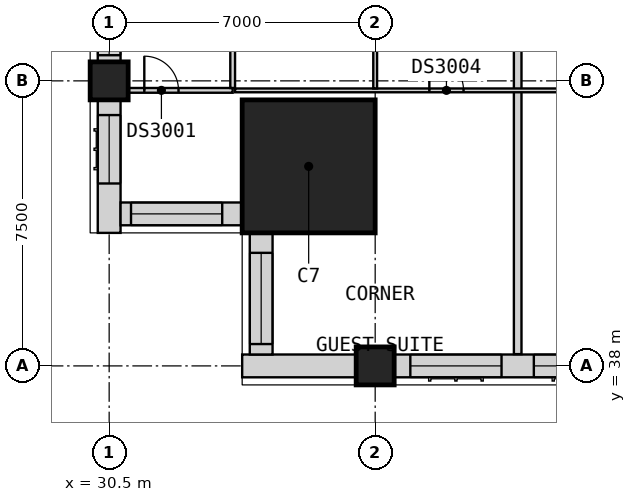
"""IFC4 building model, lengths in metres.
Left out: names, types, materials, properties, quantities, classifications, styles, units other than length and angle.
Written with IfcOpenShell. Run it as: python <this file> out.ifc"""

import sys

from ifc_helpers import new_model, si_unit, direction, frame, frame_2d, origin, origin_2d, place, context, subcontext, project, spatial, rectangle, extrude, element, fill, save


model = new_model("IFC4")
c1 = context("Model", 3, precision=1e-05, world=origin(), true_north=direction((0.0, 1.0)))
c2 = subcontext(c1, "Body", "Model", "MODEL_VIEW")
j1 = project(units=[si_unit("LENGTHUNIT", "METRE"), si_unit("PLANEANGLEUNIT", "RADIAN")], contexts=[c1])
p1 = place(None, origin())
s1 = spatial("IfcSite", under=j1, at=p1, CompositionType="ELEMENT")
p2 = place(p1, origin())
s2 = spatial("IfcBuilding", under=s1, at=p2, CompositionType="ELEMENT")
p3 = place(p2, frame((0.0, 0.0, 137.4)))
s3 = spatial("IfcBuildingStorey", under=s2, at=p3, CompositionType="ELEMENT", Elevation=137.4)
for number, where, z_axis, x_axis in (
    (1, (30.5, 45.5, 0.0), (0.0, 0.0, 1.0), (1.0, 0.0, 0.0)),
    (2, (37.5, 38.0, 0.0), (0.0, 0.0, 1.0), (1.0, 0.0, 0.0)),
):
    element("IfcColumn", number, at=place(p3, frame(where, z_axis=z_axis, x_axis=x_axis)), inside=s3, PredefinedType="COLUMN", context=c2, shape_type="SweptSolid", body=[
        extrude(rectangle(XDim=1.0, YDim=1.0, at=origin_2d()), origin(), (0.0, 0.0, 1.0), 3.6),
    ])
p4 = place(p3, frame((35.75, 43.25, 0.0), z_axis=(0.0, 0.0, 1.0), x_axis=(1.0, 0.0, 0.0)))
e3 = element("IfcColumn", 3, at=p4, inside=s3, PredefinedType="COLUMN", context=c2, shape_type="SweptSolid", body=[
    extrude(rectangle(XDim=3.5, YDim=3.5, at=origin_2d()), origin(), (0.0, 0.0, 1.0), 3.6),
])
p5 = place(p3, frame((34.0, 38.0, 0.0), z_axis=(0.0, 0.0, 1.0), x_axis=(1.0, 0.0, 0.0)))
e4 = element("IfcWall", 4, at=p5, inside=s3, PredefinedType="SOLIDWALL", context=c2, shape_type="SweptSolid", body=[
    extrude(rectangle(XDim=3.0, YDim=0.6, at=frame_2d((1.5, 0.0))), origin(), (0.0, 0.0, 1.0), 3.35),
])
p6 = place(p3, frame((38.0, 38.0, 0.0), z_axis=(0.0, 0.0, 1.0), x_axis=(1.0, 0.0, 0.0)))
e5 = element("IfcWall", 5, at=p6, inside=s3, PredefinedType="SOLIDWALL", context=c2, shape_type="SweptSolid", body=[
    extrude(rectangle(XDim=6.5, YDim=0.6, at=frame_2d((3.25, 0.0))), origin(), (0.0, 0.0, 1.0), 2.85),
])
p7 = place(p6, frame((0.425, 0.0, 0.8)))
e6 = element("IfcOpeningElement", 6, at=p7, cuts=e5, PredefinedType="OPENING", context=c2, shape_type="SweptSolid", body=[
    extrude(rectangle(XDim=2.4, YDim=1.8, at=frame_2d((1.2, 0.9))), frame((0.0, 0.31, 0.0), z_axis=(0.0, -1.0, 0.0), x_axis=(1.0, 0.0, 0.0)), (0.0, 0.0, 1.0), 0.62),
])
p8 = place(p6, frame((3.675, 0.0, 0.8)))
e7 = element("IfcOpeningElement", 7, at=p8, cuts=e5, PredefinedType="OPENING", context=c2, shape_type="SweptSolid", body=[
    extrude(rectangle(XDim=2.4, YDim=1.8, at=frame_2d((1.2, 0.9))), frame((0.0, 0.31, 0.0), z_axis=(0.0, -1.0, 0.0), x_axis=(1.0, 0.0, 0.0)), (0.0, 0.0, 1.0), 0.62),
])
p9 = place(p3, frame((30.5, 52.0, 0.0), z_axis=(0.0, 0.0, 1.0), x_axis=(0.0, -1.0, 0.0)))
e8 = element("IfcWall", 8, at=p9, inside=s3, PredefinedType="SOLIDWALL", context=c2, shape_type="SweptSolid", body=[
    extrude(rectangle(XDim=6.0, YDim=0.6, at=frame_2d((3.0, 0.0))), origin(), (0.0, 0.0, 1.0), 2.85),
])
p10 = place(p9, frame((3.425, 0.0, 0.8)))
e9 = element("IfcOpeningElement", 9, at=p10, cuts=e8, PredefinedType="OPENING", context=c2, shape_type="SweptSolid", body=[
    extrude(rectangle(XDim=2.4, YDim=1.8, at=frame_2d((1.2, 0.9))), frame((0.0, 0.31, 0.0), z_axis=(0.0, -1.0, 0.0), x_axis=(1.0, 0.0, 0.0)), (0.0, 0.0, 1.0), 0.62),
])
p11 = place(p9, frame((0.425, 0.0, 0.8)))
e10 = element("IfcOpeningElement", 10, at=p11, cuts=e8, PredefinedType="OPENING", context=c2, shape_type="SweptSolid", body=[
    extrude(rectangle(XDim=2.4, YDim=1.8, at=frame_2d((1.2, 0.9))), frame((0.0, 0.31, 0.0), z_axis=(0.0, -1.0, 0.0), x_axis=(1.0, 0.0, 0.0)), (0.0, 0.0, 1.0), 0.62),
])
p12 = place(p3, frame((30.5, 45.0, 0.0), z_axis=(0.0, 0.0, 1.0), x_axis=(0.0, -1.0, 0.0)))
e11 = element("IfcWall", 11, at=p12, inside=s3, PredefinedType="SOLIDWALL", context=c2, shape_type="SweptSolid", body=[
    extrude(rectangle(XDim=3.5, YDim=0.6, at=frame_2d((1.75, 0.0))), origin(), (0.0, 0.0, 1.0), 3.35),
])
p13 = place(p12, frame((0.4, 0.0, 0.8)))
e12 = element("IfcOpeningElement", 12, at=p13, cuts=e11, PredefinedType="OPENING", context=c2, shape_type="SweptSolid", body=[
    extrude(rectangle(XDim=1.8, YDim=1.8, at=frame_2d((0.9, 0.9))), frame((0.0, 0.31, 0.0), z_axis=(0.0, -1.0, 0.0), x_axis=(1.0, 0.0, 0.0)), (0.0, 0.0, 1.0), 0.62),
])
p14 = place(p3, frame((30.8, 42.0, 0.0), z_axis=(0.0, 0.0, 1.0), x_axis=(1.0, 0.0, 0.0)))
e13 = element("IfcWall", 13, at=p14, inside=s3, PredefinedType="SOLIDWALL", context=c2, shape_type="SweptSolid", body=[
    extrude(rectangle(XDim=3.2, YDim=0.6, at=frame_2d((1.6, 0.0))), origin(), (0.0, 0.0, 1.0), 3.35),
])
p15 = place(p14, frame((0.275, 0.0, 0.8)))
e14 = element("IfcOpeningElement", 14, at=p15, cuts=e13, PredefinedType="OPENING", context=c2, shape_type="SweptSolid", body=[
    extrude(rectangle(XDim=2.4, YDim=1.8, at=frame_2d((1.2, 0.9))), frame((0.0, 0.31, 0.0), z_axis=(0.0, -1.0, 0.0), x_axis=(1.0, 0.0, 0.0)), (0.0, 0.0, 1.0), 0.62),
])
p16 = place(p3, frame((34.5, 41.5, 0.0), z_axis=(0.0, 0.0, 1.0), x_axis=(0.0, -1.0, 0.0)))
e15 = element("IfcWall", 15, at=p16, inside=s3, PredefinedType="SOLIDWALL", context=c2, shape_type="SweptSolid", body=[
    extrude(rectangle(XDim=3.2, YDim=0.6, at=frame_2d((1.6, 0.0))), origin(), (0.0, 0.0, 1.0), 3.35),
])
p17 = place(p16, frame((0.525, 0.0, 0.8)))
e16 = element("IfcOpeningElement", 16, at=p17, cuts=e15, PredefinedType="OPENING", context=c2, shape_type="SweptSolid", body=[
    extrude(rectangle(XDim=2.4, YDim=1.8, at=frame_2d((1.2, 0.9))), frame((0.0, 0.31, 0.0), z_axis=(0.0, -1.0, 0.0), x_axis=(1.0, 0.0, 0.0)), (0.0, 0.0, 1.0), 0.62),
])
p18 = place(p3, frame((41.25, 38.31, 0.0), z_axis=(0.0, 0.0, 1.0), x_axis=(0.0, 1.0, 0.0)))
e17 = element("IfcWall", 17, at=p18, inside=s3, PredefinedType="PARTITIONING", context=c2, shape_type="SweptSolid", body=[
    extrude(rectangle(XDim=11.715, YDim=0.2, at=frame_2d((5.857, 0.0))), origin(), (0.0, 0.0, 1.0), 3.35),
])
p19 = place(p3, frame((33.812, 45.25, 0.0), z_axis=(0.0, 0.0, 1.0), x_axis=(1.0, 0.0, 0.0)))
e18 = element("IfcWall", 18, at=p19, inside=s3, PredefinedType="PARTITIONING", context=c2, shape_type="SweptSolid", body=[
    extrude(rectangle(XDim=11.875, YDim=0.1, at=frame_2d((5.938, 0.0))), origin(), (0.0, 0.0, 1.0), 3.35),
])
p20 = place(p19, frame((5.113, 0.0, 0.0)))
e19 = element("IfcOpeningElement", 19, at=p20, cuts=e18, PredefinedType="OPENING", context=c2, shape_type="SweptSolid", body=[
    extrude(rectangle(XDim=0.9, YDim=2.1, at=frame_2d((0.45, 1.05))), frame((0.0, 0.06, 0.0), z_axis=(0.0, -1.0, 0.0), x_axis=(1.0, 0.0, 0.0)), (0.0, 0.0, 1.0), 0.12),
])
p21 = place(p19, frame((9.238, 0.0, 0.0)))
e20 = element("IfcOpeningElement", 20, at=p21, cuts=e18, PredefinedType="OPENING", context=c2, shape_type="SweptSolid", body=[
    extrude(rectangle(XDim=0.9, YDim=2.1, at=frame_2d((0.45, 1.05))), frame((0.0, 0.06, 0.0), z_axis=(0.0, -1.0, 0.0), x_axis=(1.0, 0.0, 0.0)), (0.0, 0.0, 1.0), 0.12),
])
p22 = place(p3, frame((37.5, 45.3, 0.0), z_axis=(0.0, 0.0, 1.0), x_axis=(0.0, 1.0, 0.0)))
e21 = element("IfcWall", 21, at=p22, inside=s3, PredefinedType="PARTITIONING", context=c2, shape_type="SweptSolid", body=[
    extrude(rectangle(XDim=4.725, YDim=0.1, at=frame_2d((2.362, 0.0))), origin(), (0.0, 0.0, 1.0), 3.35),
])
p23 = place(p22, frame((1.925, 0.0, 0.0)))
e22 = element("IfcOpeningElement", 22, at=p23, cuts=e21, PredefinedType="OPENING", context=c2, shape_type="SweptSolid", body=[
    extrude(rectangle(XDim=0.9, YDim=2.1, at=frame_2d((0.45, 1.05))), frame((0.0, 0.06, 0.0), z_axis=(0.0, -1.0, 0.0), x_axis=(1.0, 0.0, 0.0)), (0.0, 0.0, 1.0), 0.12),
])
p24 = place(p3, frame((30.0, 45.25, 0.0), z_axis=(0.0, 0.0, 1.0), x_axis=(1.0, 0.0, 0.0)))
e23 = element("IfcWall", 23, at=p24, inside=s3, PredefinedType="PARTITIONING", context=c2, shape_type="SweptSolid", body=[
    extrude(rectangle(XDim=3.75, YDim=0.125, at=frame_2d((1.875, 0.0))), origin(), (0.0, 0.0, 1.0), 3.35),
])
p25 = place(p24, frame((1.425, 0.0, 0.0)))
e24 = element("IfcOpeningElement", 24, at=p25, cuts=e23, PredefinedType="OPENING", context=c2, shape_type="SweptSolid", body=[
    extrude(rectangle(XDim=0.9, YDim=2.1, at=frame_2d((0.45, 1.05))), frame((0.0, 0.073, 0.0), z_axis=(0.0, -1.0, 0.0), x_axis=(1.0, 0.0, 0.0)), (0.0, 0.0, 1.0), 0.145),
])
p26 = place(p3, frame((33.75, 45.312, 0.0), z_axis=(0.0, 0.0, 1.0), x_axis=(0.0, 1.0, 0.0)))
e25 = element("IfcWall", 25, at=p26, inside=s3, PredefinedType="PARTITIONING", context=c2, shape_type="SweptSolid", body=[
    extrude(rectangle(XDim=4.712, YDim=0.125, at=frame_2d((2.356, 0.0))), origin(), (0.0, 0.0, 1.0), 3.35),
])
p27 = place(p7, origin())
e26 = element("IfcWindow", 26, at=p27, inside=s3, PartitioningType="SINGLE_PANEL", PredefinedType="WINDOW", context=c2, shape_type="SweptSolid", body=[
    extrude(rectangle(XDim=2.4, YDim=1.8, at=frame_2d((1.2, 0.9))), frame((0.0, -0.07, 0.0), z_axis=(0.0, -1.0, 0.0), x_axis=(1.0, 0.0, 0.0)), (0.0, 0.0, 1.0), 0.06),
])
fill(e6, e26)
p28 = place(p8, origin())
e27 = element("IfcWindow", 27, at=p28, inside=s3, PartitioningType="SINGLE_PANEL", PredefinedType="WINDOW", context=c2, shape_type="SweptSolid", body=[
    extrude(rectangle(XDim=2.4, YDim=1.8, at=frame_2d((1.2, 0.9))), frame((0.0, -0.07, 0.0), z_axis=(0.0, -1.0, 0.0), x_axis=(1.0, 0.0, 0.0)), (0.0, 0.0, 1.0), 0.06),
])
fill(e7, e27)
p29 = place(p10, origin())
e28 = element("IfcWindow", 28, at=p29, inside=s3, PartitioningType="SINGLE_PANEL", PredefinedType="WINDOW", context=c2, shape_type="SweptSolid", body=[
    extrude(rectangle(XDim=2.4, YDim=1.8, at=frame_2d((1.2, 0.9))), frame((0.0, -0.07, 0.0), z_axis=(0.0, -1.0, 0.0), x_axis=(1.0, 0.0, 0.0)), (0.0, 0.0, 1.0), 0.06),
])
fill(e9, e28)
p30 = place(p13, origin())
e29 = element("IfcWindow", 29, at=p30, inside=s3, PartitioningType="SINGLE_PANEL", PredefinedType="WINDOW", context=c2, shape_type="SweptSolid", body=[
    extrude(rectangle(XDim=1.8, YDim=1.8, at=frame_2d((0.9, 0.9))), frame((0.0, -0.07, 0.0), z_axis=(0.0, -1.0, 0.0), x_axis=(1.0, 0.0, 0.0)), (0.0, 0.0, 1.0), 0.06),
])
fill(e12, e29)
p31 = place(p15, origin())
e30 = element("IfcWindow", 30, at=p31, inside=s3, PartitioningType="SINGLE_PANEL", PredefinedType="WINDOW", context=c2, shape_type="SweptSolid", body=[
    extrude(rectangle(XDim=2.4, YDim=1.8, at=frame_2d((1.2, 0.9))), frame((0.0, -0.07, 0.0), z_axis=(0.0, -1.0, 0.0), x_axis=(1.0, 0.0, 0.0)), (0.0, 0.0, 1.0), 0.06),
])
fill(e14, e30)
p32 = place(p17, origin())
e31 = element("IfcWindow", 31, at=p32, inside=s3, PartitioningType="SINGLE_PANEL", PredefinedType="WINDOW", context=c2, shape_type="SweptSolid", body=[
    extrude(rectangle(XDim=2.4, YDim=1.8, at=frame_2d((1.2, 0.9))), frame((0.0, -0.07, 0.0), z_axis=(0.0, -1.0, 0.0), x_axis=(1.0, 0.0, 0.0)), (0.0, 0.0, 1.0), 0.06),
])
fill(e16, e31)
p33 = place(p25, origin())
e32 = element("IfcDoor", 32, at=p33, inside=s3, OperationType="SINGLE_SWING_LEFT", PredefinedType="DOOR", context=c2, shape_type="SweptSolid", body=[
    extrude(rectangle(XDim=0.9, YDim=2.1, at=frame_2d((0.45, 1.05))), frame((0.0, 0.025, 0.0), z_axis=(0.0, -1.0, 0.0), x_axis=(1.0, 0.0, 0.0)), (0.0, 0.0, 1.0), 0.05),
])
fill(e24, e32)
p34 = place(p20, origin())
e33 = element("IfcDoor", 33, at=p34, inside=s3, OperationType="SINGLE_SWING_LEFT", PredefinedType="DOOR", context=c2, shape_type="SweptSolid", body=[
    extrude(rectangle(XDim=0.9, YDim=2.1, at=frame_2d((0.45, 1.05))), frame((0.0, 0.025, 0.0), z_axis=(0.0, -1.0, 0.0), x_axis=(1.0, 0.0, 0.0)), (0.0, 0.0, 1.0), 0.05),
])
fill(e19, e33)
save(model, sys.argv[1])
